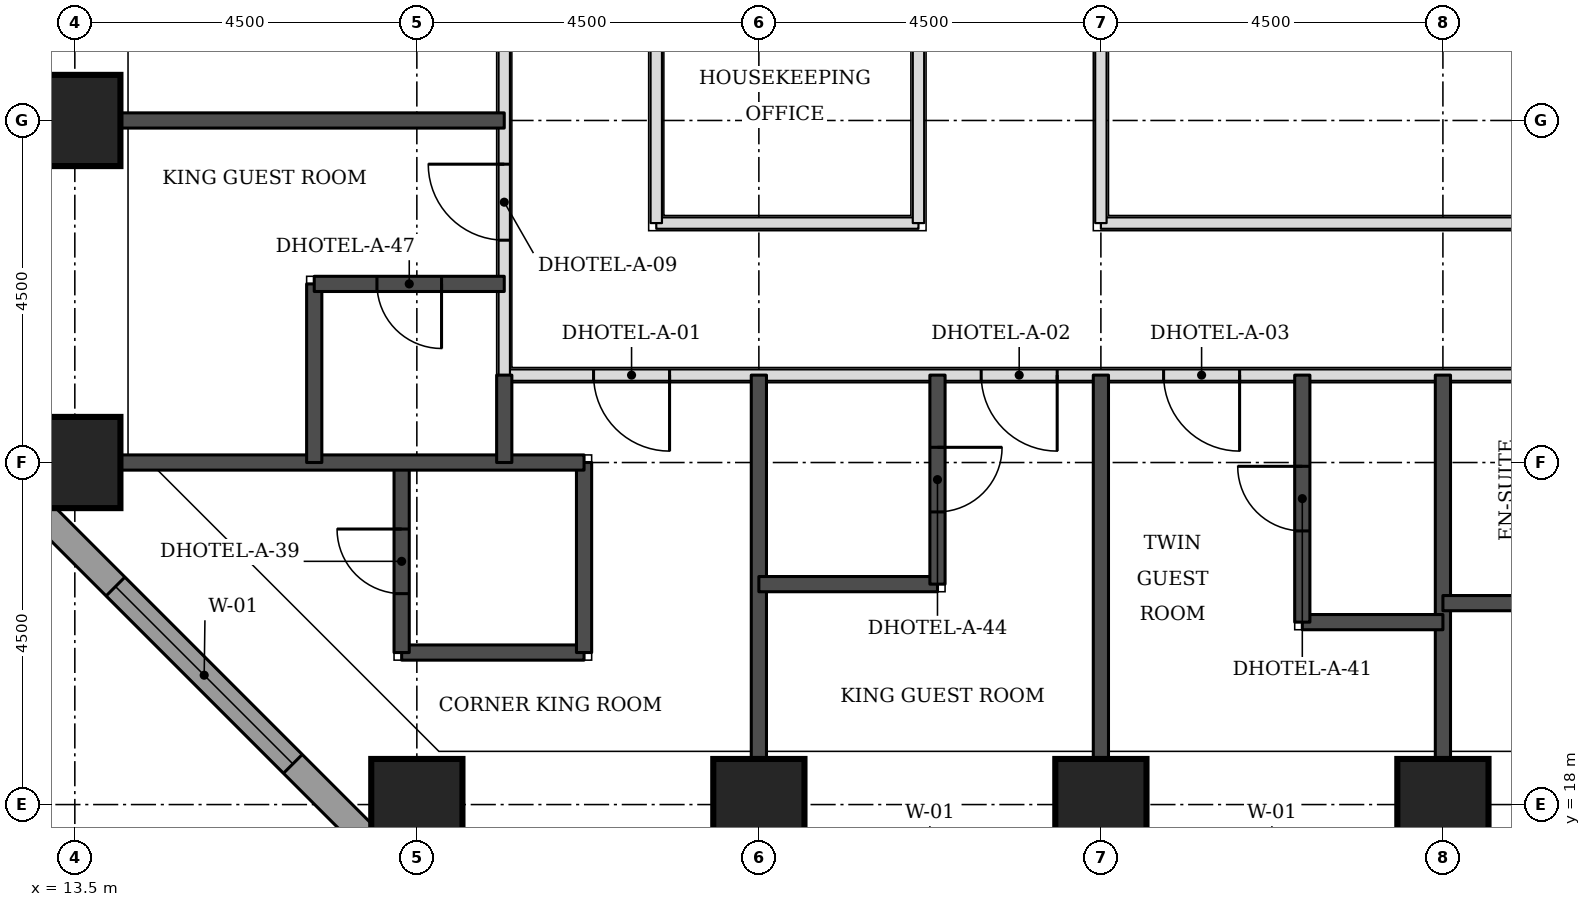
"""IFC4 building model, lengths in metres.
Left out: names, types, materials, properties, quantities, classifications, styles, units other than length and angle.
Written with IfcOpenShell. Run it as: python <this file> out.ifc"""

import sys

from ifc_helpers import new_model, si_unit, direction, frame, frame_2d, origin, origin_2d, place, context, subcontext, project, spatial, rectangle, extrude, element, fill, save


model = new_model("IFC4")
c1 = context("Model", 3, precision=1e-05, world=origin(), true_north=direction((0.0, 1.0)))
c2 = subcontext(c1, "Body", "Model", "MODEL_VIEW")
j1 = project(units=[si_unit("LENGTHUNIT", "METRE"), si_unit("PLANEANGLEUNIT", "RADIAN")], contexts=[c1])
p1 = place(None, origin())
s1 = spatial("IfcSite", under=j1, at=p1, CompositionType="ELEMENT")
p2 = place(p1, origin())
s2 = spatial("IfcBuilding", under=s1, at=p2, CompositionType="ELEMENT")
p3 = place(p2, frame((0.0, 0.0, 49.5)))
s3 = spatial("IfcBuildingStorey", under=s2, at=p3, CompositionType="ELEMENT", Elevation=49.5)
for number, where, z_axis, x_axis in (
    (1, (18.0, 18.0, 0.0), (0.0, 0.0, 1.0), (1.0, 0.0, 0.0)),
    (2, (22.5, 18.0, 0.0), (0.0, 0.0, 1.0), (1.0, 0.0, 0.0)),
    (3, (27.0, 18.0, 0.0), (0.0, 0.0, 1.0), (1.0, 0.0, 0.0)),
    (4, (31.5, 18.0, 0.0), (0.0, 0.0, 1.0), (1.0, 0.0, 0.0)),
    (5, (13.5, 22.5, 0.0), (0.0, 0.0, 1.0), (1.0, 0.0, 0.0)),
    (6, (13.5, 27.0, 0.0), (0.0, 0.0, 1.0), (1.0, 0.0, 0.0)),
):
    element("IfcColumn", number, at=place(p3, frame(where, z_axis=z_axis, x_axis=x_axis)), inside=s3, PredefinedType="COLUMN", context=c2, shape_type="SweptSolid", body=[
        extrude(rectangle(XDim=1.2, YDim=1.2, at=origin_2d()), origin(), (0.0, 0.0, 1.0), 3.3),
    ])
p4 = place(p3, frame((12.674, 22.23, 0.0), z_axis=(0.0, 0.0, 1.0), x_axis=(0.707106781187, -0.707106781187, 0.0)))
e7 = element("IfcWall", 7, at=p4, inside=s3, PredefinedType="STANDARD", context=c2, shape_type="SweptSolid", body=[
    extrude(rectangle(XDim=7.151, YDim=0.35, at=frame_2d((3.576, 0.0))), origin(), (0.0, 0.0, 1.0), 3.055),
])
p5 = place(p4, frame((1.926, 0.0, 0.8)))
e8 = element("IfcOpeningElement", 8, at=p5, cuts=e7, PredefinedType="OPENING", context=c2, shape_type="SweptSolid", body=[
    extrude(rectangle(XDim=3.3, YDim=1.5, at=frame_2d((1.65, 0.75))), frame((0.0, 0.185, 0.0), z_axis=(0.0, -1.0, 0.0), x_axis=(1.0, 0.0, 0.0)), (0.0, 0.0, 1.0), 0.37),
])
p6 = place(p3, frame((19.15, 23.65, 0.0), z_axis=(0.0, 0.0, 1.0), x_axis=(1.0, 0.0, 0.0)))
e9 = element("IfcWall", 9, at=p6, inside=s3, PredefinedType="PARTITIONING", context=c2, shape_type="SweptSolid", body=[
    extrude(rectangle(XDim=32.35, YDim=0.15, at=frame_2d((16.175, 0.0))), origin(), (0.0, 0.0, 1.0), 3.08),
])
p7 = place(p6, frame((6.275, 0.0, 0.0)))
e10 = element("IfcOpeningElement", 10, at=p7, cuts=e9, PredefinedType="OPENING", context=c2, shape_type="SweptSolid", body=[
    extrude(rectangle(XDim=1.0, YDim=2.1, at=frame_2d((0.5, 1.05))), frame((0.0, 0.085, 0.0), z_axis=(0.0, -1.0, 0.0), x_axis=(1.0, 0.0, 0.0)), (0.0, 0.0, 1.0), 0.17),
])
p8 = place(p6, frame((8.675, 0.0, 0.0)))
e11 = element("IfcOpeningElement", 11, at=p8, cuts=e9, PredefinedType="OPENING", context=c2, shape_type="SweptSolid", body=[
    extrude(rectangle(XDim=1.0, YDim=2.1, at=frame_2d((0.5, 1.05))), frame((0.0, 0.085, 0.0), z_axis=(0.0, -1.0, 0.0), x_axis=(1.0, 0.0, 0.0)), (0.0, 0.0, 1.0), 0.17),
])
p9 = place(p6, frame((15.25, 0.0, 0.0)))
e12 = element("IfcOpeningElement", 12, at=p9, cuts=e9, PredefinedType="OPENING", context=c2, shape_type="SweptSolid", body=[
    extrude(rectangle(XDim=1.0, YDim=2.1, at=frame_2d((0.5, 1.05))), frame((0.0, 0.085, 0.0), z_axis=(0.0, -1.0, 0.0), x_axis=(1.0, 0.0, 0.0)), (0.0, 0.0, 1.0), 0.17),
])
p10 = place(p6, frame((17.675, 0.0, 0.0)))
e13 = element("IfcOpeningElement", 13, at=p10, cuts=e9, PredefinedType="OPENING", context=c2, shape_type="SweptSolid", body=[
    extrude(rectangle(XDim=1.0, YDim=2.1, at=frame_2d((0.5, 1.05))), frame((0.0, 0.085, 0.0), z_axis=(0.0, -1.0, 0.0), x_axis=(1.0, 0.0, 0.0)), (0.0, 0.0, 1.0), 0.17),
])
p11 = place(p6, frame((24.275, 0.0, 0.0)))
e14 = element("IfcOpeningElement", 14, at=p11, cuts=e9, PredefinedType="OPENING", context=c2, shape_type="SweptSolid", body=[
    extrude(rectangle(XDim=1.0, YDim=2.1, at=frame_2d((0.5, 1.05))), frame((0.0, 0.085, 0.0), z_axis=(0.0, -1.0, 0.0), x_axis=(1.0, 0.0, 0.0)), (0.0, 0.0, 1.0), 0.17),
])
p12 = place(p6, frame((26.675, 0.0, 0.0)))
e15 = element("IfcOpeningElement", 15, at=p12, cuts=e9, PredefinedType="OPENING", context=c2, shape_type="SweptSolid", body=[
    extrude(rectangle(XDim=1.0, YDim=2.1, at=frame_2d((0.5, 1.05))), frame((0.0, 0.085, 0.0), z_axis=(0.0, -1.0, 0.0), x_axis=(1.0, 0.0, 0.0)), (0.0, 0.0, 1.0), 0.17),
])
p13 = place(p6, frame((1.175, 0.0, 0.0)))
e16 = element("IfcOpeningElement", 16, at=p13, cuts=e9, PredefinedType="OPENING", context=c2, shape_type="SweptSolid", body=[
    extrude(rectangle(XDim=1.0, YDim=2.1, at=frame_2d((0.5, 1.05))), frame((0.0, 0.085, 0.0), z_axis=(0.0, -1.0, 0.0), x_axis=(1.0, 0.0, 0.0)), (0.0, 0.0, 1.0), 0.17),
])
p14 = place(p6, frame((30.85, 0.0, 0.0)))
e17 = element("IfcOpeningElement", 17, at=p14, cuts=e9, PredefinedType="OPENING", context=c2, shape_type="SweptSolid", body=[
    extrude(rectangle(XDim=1.0, YDim=2.1, at=frame_2d((0.5, 1.05))), frame((0.0, 0.085, 0.0), z_axis=(0.0, -1.0, 0.0), x_axis=(1.0, 0.0, 0.0)), (0.0, 0.0, 1.0), 0.17),
])
p15 = place(p3, frame((19.15, 23.65, 0.0), z_axis=(0.0, 0.0, 1.0), x_axis=(0.0, 1.0, 0.0)))
e18 = element("IfcWall", 18, at=p15, inside=s3, PredefinedType="PARTITIONING", context=c2, shape_type="SweptSolid", body=[
    extrude(rectangle(XDim=25.85, YDim=0.15, at=frame_2d((12.925, 0.0))), origin(), (0.0, 0.0, 1.0), 3.08),
])
p16 = place(p15, frame((1.775, 0.0, 0.0)))
e19 = element("IfcOpeningElement", 19, at=p16, cuts=e18, PredefinedType="OPENING", context=c2, shape_type="SweptSolid", body=[
    extrude(rectangle(XDim=1.0, YDim=2.1, at=frame_2d((0.5, 1.05))), frame((0.0, 0.085, 0.0), z_axis=(0.0, -1.0, 0.0), x_axis=(1.0, 0.0, 0.0)), (0.0, 0.0, 1.0), 0.17),
])
p17 = place(p15, frame((6.125, 0.0, 0.0)))
e20 = element("IfcOpeningElement", 20, at=p17, cuts=e18, PredefinedType="OPENING", context=c2, shape_type="SweptSolid", body=[
    extrude(rectangle(XDim=1.0, YDim=2.1, at=frame_2d((0.5, 1.05))), frame((0.0, 0.085, 0.0), z_axis=(0.0, -1.0, 0.0), x_axis=(1.0, 0.0, 0.0)), (0.0, 0.0, 1.0), 0.17),
])
p18 = place(p15, frame((17.825, 0.0, 0.0)))
e21 = element("IfcOpeningElement", 21, at=p18, cuts=e18, PredefinedType="OPENING", context=c2, shape_type="SweptSolid", body=[
    extrude(rectangle(XDim=1.0, YDim=2.1, at=frame_2d((0.5, 1.05))), frame((0.0, 0.085, 0.0), z_axis=(0.0, -1.0, 0.0), x_axis=(1.0, 0.0, 0.0)), (0.0, 0.0, 1.0), 0.17),
])
p19 = place(p15, frame((23.04, 0.0, 0.0)))
e22 = element("IfcOpeningElement", 22, at=p19, cuts=e18, PredefinedType="OPENING", context=c2, shape_type="SweptSolid", body=[
    extrude(rectangle(XDim=0.9, YDim=2.1, at=frame_2d((0.45, 1.05))), frame((0.0, 0.085, 0.0), z_axis=(0.0, -1.0, 0.0), x_axis=(1.0, 0.0, 0.0)), (0.0, 0.0, 1.0), 0.17),
])
p20 = place(p3, frame((21.15, 25.65, 0.0), z_axis=(0.0, 0.0, 1.0), x_axis=(1.0, 0.0, 0.0)))
e23 = element("IfcWall", 23, at=p20, inside=s3, PredefinedType="PARTITIONING", context=c2, shape_type="SweptSolid", body=[
    extrude(rectangle(XDim=3.45, YDim=0.15, at=frame_2d((1.725, 0.0))), origin(), (0.0, 0.0, 1.0), 3.08),
])
p21 = place(p3, frame((21.15, 25.65, 0.0), z_axis=(0.0, 0.0, 1.0), x_axis=(0.0, 1.0, 0.0)))
e24 = element("IfcWall", 24, at=p21, inside=s3, PredefinedType="PARTITIONING", context=c2, shape_type="SweptSolid", body=[
    extrude(rectangle(XDim=17.35, YDim=0.15, at=frame_2d((8.675, 0.0))), origin(), (0.0, 0.0, 1.0), 3.08),
])
p22 = place(p21, frame((3.3, 0.0, 0.0)))
e25 = element("IfcOpeningElement", 25, at=p22, cuts=e24, PredefinedType="OPENING", context=c2, shape_type="SweptSolid", body=[
    extrude(rectangle(XDim=0.9, YDim=2.1, at=frame_2d((0.45, 1.05))), frame((0.0, 0.085, 0.0), z_axis=(0.0, -1.0, 0.0), x_axis=(1.0, 0.0, 0.0)), (0.0, 0.0, 1.0), 0.17),
])
p23 = place(p21, frame((10.725, 0.0, 0.0)))
e26 = element("IfcOpeningElement", 26, at=p23, cuts=e24, PredefinedType="OPENING", context=c2, shape_type="SweptSolid", body=[
    extrude(rectangle(XDim=0.9, YDim=2.1, at=frame_2d((0.45, 1.05))), frame((0.0, 0.085, 0.0), z_axis=(0.0, -1.0, 0.0), x_axis=(1.0, 0.0, 0.0)), (0.0, 0.0, 1.0), 0.17),
])
p24 = place(p3, frame((24.6, 25.65, 0.0), z_axis=(0.0, 0.0, 1.0), x_axis=(0.0, 1.0, 0.0)))
e27 = element("IfcWall", 27, at=p24, inside=s3, PredefinedType="PARTITIONING", context=c2, shape_type="SweptSolid", body=[
    extrude(rectangle(XDim=14.85, YDim=0.15, at=frame_2d((7.425, 0.0))), origin(), (0.0, 0.0, 1.0), 3.08),
])
p25 = place(p3, frame((27.0, 25.65, 0.0), z_axis=(0.0, 0.0, 1.0), x_axis=(1.0, 0.0, 0.0)))
e28 = element("IfcWall", 28, at=p25, inside=s3, PredefinedType="PARTITIONING", context=c2, shape_type="SweptSolid", body=[
    extrude(rectangle(XDim=11.5, YDim=0.15, at=frame_2d((5.75, 0.0))), origin(), (0.0, 0.0, 1.0), 3.08),
])
p26 = place(p3, frame((27.0, 25.65, 0.0), z_axis=(0.0, 0.0, 1.0), x_axis=(0.0, 1.0, 0.0)))
e29 = element("IfcWall", 29, at=p26, inside=s3, PredefinedType="PARTITIONING", context=c2, shape_type="SweptSolid", body=[
    extrude(rectangle(XDim=3.85, YDim=0.15, at=frame_2d((1.925, 0.0))), origin(), (0.0, 0.0, 1.0), 3.08),
])
for number, where, z_axis, x_axis in (
    (30, (22.5, 18.6, 0.0), (0.0, 0.0, 1.0), (0.0, 1.0, 0.0)),
    (31, (27.0, 18.6, 0.0), (0.0, 0.0, 1.0), (0.0, 1.0, 0.0)),
    (32, (31.5, 18.6, 0.0), (0.0, 0.0, 1.0), (0.0, 1.0, 0.0)),
):
    element("IfcWall", number, at=place(p3, frame(where, z_axis=z_axis, x_axis=x_axis)), inside=s3, PredefinedType="SOLIDWALL", context=c2, shape_type="SweptSolid", body=[
        extrude(rectangle(XDim=5.05, YDim=0.2, at=frame_2d((2.525, 0.0))), origin(), (0.0, 0.0, 1.0), 3.08),
    ])
p27 = place(p3, frame((17.8, 20.0, 0.0), z_axis=(0.0, 0.0, 1.0), x_axis=(1.0, 0.0, 0.0)))
e33 = element("IfcWall", 33, at=p27, inside=s3, PredefinedType="SOLIDWALL", context=c2, shape_type="SweptSolid", body=[
    extrude(rectangle(XDim=2.4, YDim=0.2, at=frame_2d((1.2, 0.0))), origin(), (0.0, 0.0, 1.0), 3.08),
])
p28 = place(p3, frame((17.8, 20.0, 0.0), z_axis=(0.0, 0.0, 1.0), x_axis=(0.0, 1.0, 0.0)))
e34 = element("IfcWall", 34, at=p28, inside=s3, PredefinedType="SOLIDWALL", context=c2, shape_type="SweptSolid", body=[
    extrude(rectangle(XDim=2.5, YDim=0.2, at=frame_2d((1.25, 0.0))), origin(), (0.0, 0.0, 1.0), 3.08),
])
p29 = place(p28, frame((0.775, 0.0, 0.0)))
e35 = element("IfcOpeningElement", 35, at=p29, cuts=e34, PredefinedType="OPENING", context=c2, shape_type="SweptSolid", body=[
    extrude(rectangle(XDim=0.85, YDim=2.1, at=frame_2d((0.425, 1.05))), frame((0.0, 0.11, 0.0), z_axis=(0.0, -1.0, 0.0), x_axis=(1.0, 0.0, 0.0)), (0.0, 0.0, 1.0), 0.22),
])
p30 = place(p3, frame((20.2, 20.0, 0.0), z_axis=(0.0, 0.0, 1.0), x_axis=(0.0, 1.0, 0.0)))
e36 = element("IfcWall", 36, at=p30, inside=s3, PredefinedType="SOLIDWALL", context=c2, shape_type="SweptSolid", body=[
    extrude(rectangle(XDim=2.5, YDim=0.2, at=frame_2d((1.25, 0.0))), origin(), (0.0, 0.0, 1.0), 3.08),
])
p31 = place(p3, frame((29.65, 20.4, 0.0), z_axis=(0.0, 0.0, 1.0), x_axis=(1.0, 0.0, 0.0)))
e37 = element("IfcWall", 37, at=p31, inside=s3, PredefinedType="SOLIDWALL", context=c2, shape_type="SweptSolid", body=[
    extrude(rectangle(XDim=1.85, YDim=0.2, at=frame_2d((0.925, 0.0))), origin(), (0.0, 0.0, 1.0), 3.08),
])
p32 = place(p3, frame((29.65, 20.4, 0.0), z_axis=(0.0, 0.0, 1.0), x_axis=(0.0, 1.0, 0.0)))
e38 = element("IfcWall", 38, at=p32, inside=s3, PredefinedType="SOLIDWALL", context=c2, shape_type="SweptSolid", body=[
    extrude(rectangle(XDim=3.25, YDim=0.2, at=frame_2d((1.625, 0.0))), origin(), (0.0, 0.0, 1.0), 3.08),
])
p33 = place(p32, frame((1.2, 0.0, 0.0)))
e39 = element("IfcOpeningElement", 39, at=p33, cuts=e38, PredefinedType="OPENING", context=c2, shape_type="SweptSolid", body=[
    extrude(rectangle(XDim=0.85, YDim=2.1, at=frame_2d((0.425, 1.05))), frame((0.0, 0.11, 0.0), z_axis=(0.0, -1.0, 0.0), x_axis=(1.0, 0.0, 0.0)), (0.0, 0.0, 1.0), 0.22),
])
for number, where, z_axis, x_axis in (
    (40, (31.5, 20.65, 0.0), (0.0, 0.0, 1.0), (1.0, 0.0, 0.0)),
    (41, (22.5, 20.9, 0.0), (0.0, 0.0, 1.0), (1.0, 0.0, 0.0)),
):
    element("IfcWall", number, at=place(p3, frame(where, z_axis=z_axis, x_axis=x_axis)), inside=s3, PredefinedType="SOLIDWALL", context=c2, shape_type="SweptSolid", body=[
        extrude(rectangle(XDim=2.35, YDim=0.2, at=frame_2d((1.175, 0.0))), origin(), (0.0, 0.0, 1.0), 3.08),
    ])
p34 = place(p3, frame((24.85, 20.9, 0.0), z_axis=(0.0, 0.0, 1.0), x_axis=(0.0, 1.0, 0.0)))
e42 = element("IfcWall", 42, at=p34, inside=s3, PredefinedType="SOLIDWALL", context=c2, shape_type="SweptSolid", body=[
    extrude(rectangle(XDim=2.75, YDim=0.2, at=frame_2d((1.375, 0.0))), origin(), (0.0, 0.0, 1.0), 3.08),
])
p35 = place(p34, frame((0.95, 0.0, 0.0)))
e43 = element("IfcOpeningElement", 43, at=p35, cuts=e42, PredefinedType="OPENING", context=c2, shape_type="SweptSolid", body=[
    extrude(rectangle(XDim=0.85, YDim=2.1, at=frame_2d((0.425, 1.05))), frame((0.0, 0.11, 0.0), z_axis=(0.0, -1.0, 0.0), x_axis=(1.0, 0.0, 0.0)), (0.0, 0.0, 1.0), 0.22),
])
p36 = place(p3, frame((14.1, 22.5, 0.0), z_axis=(0.0, 0.0, 1.0), x_axis=(1.0, 0.0, 0.0)))
e44 = element("IfcWall", 44, at=p36, inside=s3, PredefinedType="SOLIDWALL", context=c2, shape_type="SweptSolid", body=[
    extrude(rectangle(XDim=6.1, YDim=0.2, at=frame_2d((3.05, 0.0))), origin(), (0.0, 0.0, 1.0), 3.08),
])
p37 = place(p3, frame((16.65, 22.5, 0.0), z_axis=(0.0, 0.0, 1.0), x_axis=(0.0, 1.0, 0.0)))
e45 = element("IfcWall", 45, at=p37, inside=s3, PredefinedType="SOLIDWALL", context=c2, shape_type="SweptSolid", body=[
    extrude(rectangle(XDim=2.35, YDim=0.2, at=frame_2d((1.175, 0.0))), origin(), (0.0, 0.0, 1.0), 3.08),
])
p38 = place(p3, frame((19.15, 22.5, 0.0), z_axis=(0.0, 0.0, 1.0), x_axis=(0.0, 1.0, 0.0)))
e46 = element("IfcWall", 46, at=p38, inside=s3, PredefinedType="SOLIDWALL", context=c2, shape_type="SweptSolid", body=[
    extrude(rectangle(XDim=1.15, YDim=0.2, at=frame_2d((0.575, 0.0))), origin(), (0.0, 0.0, 1.0), 3.08),
])
p39 = place(p3, frame((16.65, 24.85, 0.0), z_axis=(0.0, 0.0, 1.0), x_axis=(1.0, 0.0, 0.0)))
e47 = element("IfcWall", 47, at=p39, inside=s3, PredefinedType="SOLIDWALL", context=c2, shape_type="SweptSolid", body=[
    extrude(rectangle(XDim=2.5, YDim=0.2, at=frame_2d((1.25, 0.0))), origin(), (0.0, 0.0, 1.0), 3.08),
])
p40 = place(p39, frame((0.825, 0.0, 0.0)))
e48 = element("IfcOpeningElement", 48, at=p40, cuts=e47, PredefinedType="OPENING", context=c2, shape_type="SweptSolid", body=[
    extrude(rectangle(XDim=0.85, YDim=2.1, at=frame_2d((0.425, 1.05))), frame((0.0, 0.11, 0.0), z_axis=(0.0, -1.0, 0.0), x_axis=(1.0, 0.0, 0.0)), (0.0, 0.0, 1.0), 0.22),
])
p41 = place(p3, frame((14.1, 27.0, 0.0), z_axis=(0.0, 0.0, 1.0), x_axis=(1.0, 0.0, 0.0)))
e49 = element("IfcWall", 49, at=p41, inside=s3, PredefinedType="SOLIDWALL", context=c2, shape_type="SweptSolid", body=[
    extrude(rectangle(XDim=5.05, YDim=0.2, at=frame_2d((2.525, 0.0))), origin(), (0.0, 0.0, 1.0), 3.08),
])
p42 = place(p5, origin())
e50 = element("IfcWindow", 50, at=p42, inside=s3, PartitioningType="SINGLE_PANEL", PredefinedType="WINDOW", context=c2, shape_type="SweptSolid", body=[
    extrude(rectangle(XDim=3.3, YDim=1.5, at=frame_2d((1.65, 0.75))), frame((0.0, 0.085, 0.0), z_axis=(0.0, -1.0, 0.0), x_axis=(1.0, 0.0, 0.0)), (0.0, 0.0, 1.0), 0.06),
])
fill(e8, e50)
p43 = place(p7, frame((1.0, 0.0, 0.0), z_axis=(0.0, 0.0, 1.0), x_axis=(-1.0, 0.0, 0.0)))
e51 = element("IfcDoor", 51, at=p43, inside=s3, OperationType="SINGLE_SWING_LEFT", PredefinedType="DOOR", context=c2, shape_type="SweptSolid", body=[
    extrude(rectangle(XDim=1.0, YDim=2.1, at=frame_2d((0.5, 1.05))), frame((0.0, 0.025, 0.0), z_axis=(0.0, -1.0, 0.0), x_axis=(1.0, 0.0, 0.0)), (0.0, 0.0, 1.0), 0.05),
])
fill(e10, e51)
p44 = place(p35, frame((0.85, 0.0, 0.0), z_axis=(0.0, 0.0, 1.0), x_axis=(-1.0, 0.0, 0.0)))
e52 = element("IfcDoor", 52, at=p44, inside=s3, OperationType="SINGLE_SWING_LEFT", PredefinedType="DOOR", context=c2, shape_type="SweptSolid", body=[
    extrude(rectangle(XDim=0.85, YDim=2.1, at=frame_2d((0.425, 1.05))), frame((0.0, 0.025, 0.0), z_axis=(0.0, -1.0, 0.0), x_axis=(1.0, 0.0, 0.0)), (0.0, 0.0, 1.0), 0.05),
])
fill(e43, e52)
p45 = place(p8, frame((1.0, 0.0, 0.0), z_axis=(0.0, 0.0, 1.0), x_axis=(-1.0, 0.0, 0.0)))
e53 = element("IfcDoor", 53, at=p45, inside=s3, OperationType="SINGLE_SWING_LEFT", PredefinedType="DOOR", context=c2, shape_type="SweptSolid", body=[
    extrude(rectangle(XDim=1.0, YDim=2.1, at=frame_2d((0.5, 1.05))), frame((0.0, 0.025, 0.0), z_axis=(0.0, -1.0, 0.0), x_axis=(1.0, 0.0, 0.0)), (0.0, 0.0, 1.0), 0.05),
])
fill(e11, e53)
p46 = place(p33, origin())
e54 = element("IfcDoor", 54, at=p46, inside=s3, OperationType="SINGLE_SWING_RIGHT", PredefinedType="DOOR", context=c2, shape_type="SweptSolid", body=[
    extrude(rectangle(XDim=0.85, YDim=2.1, at=frame_2d((0.425, 1.05))), frame((0.0, 0.025, 0.0), z_axis=(0.0, -1.0, 0.0), x_axis=(1.0, 0.0, 0.0)), (0.0, 0.0, 1.0), 0.05),
])
fill(e39, e54)
p47 = place(p16, origin())
e55 = element("IfcDoor", 55, at=p47, inside=s3, OperationType="SINGLE_SWING_RIGHT", PredefinedType="DOOR", context=c2, shape_type="SweptSolid", body=[
    extrude(rectangle(XDim=1.0, YDim=2.1, at=frame_2d((0.5, 1.05))), frame((0.0, 0.025, 0.0), z_axis=(0.0, -1.0, 0.0), x_axis=(1.0, 0.0, 0.0)), (0.0, 0.0, 1.0), 0.05),
])
fill(e19, e55)
p48 = place(p40, frame((0.85, 0.0, 0.0), z_axis=(0.0, 0.0, 1.0), x_axis=(-1.0, 0.0, 0.0)))
e56 = element("IfcDoor", 56, at=p48, inside=s3, OperationType="SINGLE_SWING_LEFT", PredefinedType="DOOR", context=c2, shape_type="SweptSolid", body=[
    extrude(rectangle(XDim=0.85, YDim=2.1, at=frame_2d((0.425, 1.05))), frame((0.0, 0.025, 0.0), z_axis=(0.0, -1.0, 0.0), x_axis=(1.0, 0.0, 0.0)), (0.0, 0.0, 1.0), 0.05),
])
fill(e48, e56)
p49 = place(p13, frame((1.0, 0.0, 0.0), z_axis=(0.0, 0.0, 1.0), x_axis=(-1.0, 0.0, 0.0)))
e57 = element("IfcDoor", 57, at=p49, inside=s3, OperationType="SINGLE_SWING_LEFT", PredefinedType="DOOR", context=c2, shape_type="SweptSolid", body=[
    extrude(rectangle(XDim=1.0, YDim=2.1, at=frame_2d((0.5, 1.05))), frame((0.0, 0.025, 0.0), z_axis=(0.0, -1.0, 0.0), x_axis=(1.0, 0.0, 0.0)), (0.0, 0.0, 1.0), 0.05),
])
fill(e16, e57)
p50 = place(p29, origin())
e58 = element("IfcDoor", 58, at=p50, inside=s3, OperationType="SINGLE_SWING_RIGHT", PredefinedType="DOOR", context=c2, shape_type="SweptSolid", body=[
    extrude(rectangle(XDim=0.85, YDim=2.1, at=frame_2d((0.425, 1.05))), frame((0.0, 0.025, 0.0), z_axis=(0.0, -1.0, 0.0), x_axis=(1.0, 0.0, 0.0)), (0.0, 0.0, 1.0), 0.05),
])
fill(e35, e58)
save(model, sys.argv[1])
